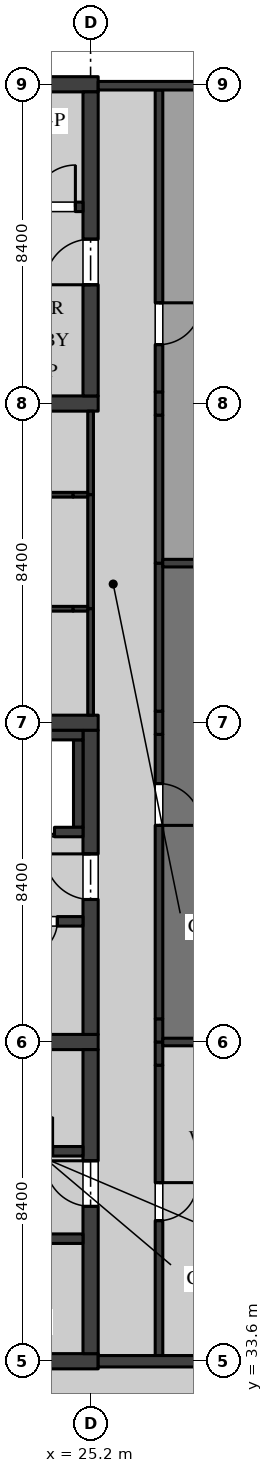
"""IFC4 building model, lengths in metres.
Left out: names, types, materials, properties, quantities, classifications, styles, units other than length and angle.
Written with IfcOpenShell. Run it as: python <this file> out.ifc"""

import sys

from ifc_helpers import new_model, si_unit, direction, frame, frame_2d, origin, place, context, subcontext, project, spatial, rectangle, extrude, element, fill, save


model = new_model("IFC4")
c1 = context("Model", 3, precision=1e-05, world=origin(), true_north=direction((0.0, 1.0)))
c2 = subcontext(c1, "Body", "Model", "MODEL_VIEW")
j1 = project(units=[si_unit("LENGTHUNIT", "METRE"), si_unit("PLANEANGLEUNIT", "RADIAN")], contexts=[c1])
p1 = place(None, origin())
s1 = spatial("IfcSite", under=j1, at=p1, CompositionType="ELEMENT")
p2 = place(p1, origin())
s2 = spatial("IfcBuilding", under=s1, at=p2, CompositionType="ELEMENT")
p3 = place(p2, frame((0.0, 0.0, 14.4)))
s3 = spatial("IfcBuildingStorey", under=s2, at=p3, CompositionType="ELEMENT", Elevation=14.4)
p4 = place(p3, frame((16.6, 42.0, 0.0), z_axis=(0.0, 0.0, 1.0), x_axis=(1.0, 0.0, 0.0)))
e1 = element("IfcWall", 1, at=p4, inside=s3, PredefinedType="SHEAR", context=c2, shape_type="SweptSolid", body=[
    extrude(rectangle(XDim=8.8, YDim=0.4, at=frame_2d((4.4, 0.0))), origin(), (0.0, 0.0, 1.0), 4.37),
])
p5 = place(p4, frame((1.05, 0.0, 0.0)))
e2 = element("IfcOpeningElement", 2, at=p5, cuts=e1, PredefinedType="OPENING", context=c2, shape_type="SweptSolid", body=[
    extrude(rectangle(XDim=1.1, YDim=2.1, at=frame_2d((0.55, 1.05))), frame((0.0, 0.21, 0.0), z_axis=(0.0, -1.0, 0.0), x_axis=(1.0, 0.0, 0.0)), (0.0, 0.0, 1.0), 0.42),
])
p6 = place(p3, frame((16.6, 50.4, 0.0), z_axis=(0.0, 0.0, 1.0), x_axis=(1.0, 0.0, 0.0)))
e3 = element("IfcWall", 3, at=p6, inside=s3, PredefinedType="SHEAR", context=c2, shape_type="SweptSolid", body=[
    extrude(rectangle(XDim=8.8, YDim=0.4, at=frame_2d((4.4, 0.0))), origin(), (0.0, 0.0, 1.0), 4.37),
])
p7 = place(p3, frame((25.2, 42.2, 0.0), z_axis=(0.0, 0.0, 1.0), x_axis=(0.0, 1.0, 0.0)))
e4 = element("IfcWall", 4, at=p7, inside=s3, PredefinedType="SHEAR", context=c2, shape_type="SweptSolid", body=[
    extrude(rectangle(XDim=8.0, YDim=0.4, at=frame_2d((4.0, 0.0))), origin(), (0.0, 0.0, 1.0), 4.37),
])
p8 = place(p7, frame((3.55, 0.0, 0.0)))
e5 = element("IfcOpeningElement", 5, at=p8, cuts=e4, PredefinedType="OPENING", context=c2, shape_type="SweptSolid", body=[
    extrude(rectangle(XDim=1.2, YDim=2.1, at=frame_2d((0.6, 1.05))), frame((0.0, 0.21, 0.0), z_axis=(0.0, -1.0, 0.0), x_axis=(1.0, 0.0, 0.0)), (0.0, 0.0, 1.0), 0.42),
])
p9 = place(p3, frame((25.0, 45.175, 0.0), z_axis=(0.0, 0.0, 1.0), x_axis=(-1.0, 0.0, 0.0)))
e6 = element("IfcWall", 6, at=p9, inside=s3, PredefinedType="SOLIDWALL", context=c2, shape_type="SweptSolid", body=[
    extrude(rectangle(XDim=2.25, YDim=0.25, at=frame_2d((1.125, 0.0))), origin(), (0.0, 0.0, 1.0), 4.37),
])
p10 = place(p9, frame((0.675, 0.0, 0.0)))
e7 = element("IfcOpeningElement", 7, at=p10, cuts=e6, PredefinedType="OPENING", context=c2, shape_type="SweptSolid", body=[
    extrude(rectangle(XDim=0.9, YDim=2.1, at=frame_2d((0.45, 1.05))), frame((0.0, 0.135, 0.0), z_axis=(0.0, -1.0, 0.0), x_axis=(1.0, 0.0, 0.0)), (0.0, 0.0, 1.0), 0.27),
])
for number, where, z_axis, x_axis in (
    (8, (16.6, 58.8, 0.0), (0.0, 0.0, 1.0), (1.0, 0.0, 0.0)),
    (9, (16.6, 67.2, 0.0), (0.0, 0.0, 1.0), (1.0, 0.0, 0.0)),
):
    element("IfcWall", number, at=place(p3, frame(where, z_axis=z_axis, x_axis=x_axis)), inside=s3, PredefinedType="SHEAR", context=c2, shape_type="SweptSolid", body=[
        extrude(rectangle(XDim=8.8, YDim=0.4, at=frame_2d((4.4, 0.0))), origin(), (0.0, 0.0, 1.0), 4.37),
    ])
p11 = place(p3, frame((25.2, 59.0, 0.0), z_axis=(0.0, 0.0, 1.0), x_axis=(0.0, 1.0, 0.0)))
e10 = element("IfcWall", 10, at=p11, inside=s3, PredefinedType="SHEAR", context=c2, shape_type="SweptSolid", body=[
    extrude(rectangle(XDim=8.0, YDim=0.4, at=frame_2d((4.0, 0.0))), origin(), (0.0, 0.0, 1.0), 4.37),
])
p12 = place(p11, frame((2.925, 0.0, 0.0)))
e11 = element("IfcOpeningElement", 11, at=p12, cuts=e10, PredefinedType="OPENING", context=c2, shape_type="SweptSolid", body=[
    extrude(rectangle(XDim=1.2, YDim=2.1, at=frame_2d((0.6, 1.05))), frame((0.0, 0.21, 0.0), z_axis=(0.0, -1.0, 0.0), x_axis=(1.0, 0.0, 0.0)), (0.0, 0.0, 1.0), 0.42),
])
p13 = place(p3, frame((25.0, 63.975, 0.0), z_axis=(0.0, 0.0, 1.0), x_axis=(-1.0, 0.0, 0.0)))
e12 = element("IfcWall", 12, at=p13, inside=s3, PredefinedType="SOLIDWALL", context=c2, shape_type="SweptSolid", body=[
    extrude(rectangle(XDim=8.0, YDim=0.25, at=frame_2d((4.0, 0.0))), origin(), (0.0, 0.0, 1.0), 4.37),
])
p14 = place(p13, frame((0.2, 0.0, 0.0)))
e13 = element("IfcOpeningElement", 13, at=p14, cuts=e12, PredefinedType="OPENING", context=c2, shape_type="SweptSolid", body=[
    extrude(rectangle(XDim=1.1, YDim=2.1, at=frame_2d((0.55, 1.05))), frame((0.0, 0.135, 0.0), z_axis=(0.0, -1.0, 0.0), x_axis=(1.0, 0.0, 0.0)), (0.0, 0.0, 1.0), 0.27),
])
p15 = place(p3, frame((16.6, 33.6, 0.0), z_axis=(0.0, 0.0, 1.0), x_axis=(1.0, 0.0, 0.0)))
e14 = element("IfcWall", 14, at=p15, inside=s3, PredefinedType="SHEAR", context=c2, shape_type="SweptSolid", body=[
    extrude(rectangle(XDim=8.8, YDim=0.4, at=frame_2d((4.4, 0.0))), origin(), (0.0, 0.0, 1.0), 4.37),
])
p16 = place(p3, frame((25.2, 33.8, 0.0), z_axis=(0.0, 0.0, 1.0), x_axis=(0.0, 1.0, 0.0)))
e15 = element("IfcWall", 15, at=p16, inside=s3, PredefinedType="SHEAR", context=c2, shape_type="SweptSolid", body=[
    extrude(rectangle(XDim=8.0, YDim=0.4, at=frame_2d((4.0, 0.0))), origin(), (0.0, 0.0, 1.0), 4.37),
])
p17 = place(p16, frame((3.875, 0.0, 0.0)))
e16 = element("IfcOpeningElement", 16, at=p17, cuts=e15, PredefinedType="OPENING", context=c2, shape_type="SweptSolid", body=[
    extrude(rectangle(XDim=1.2, YDim=2.1, at=frame_2d((0.6, 1.05))), frame((0.0, 0.21, 0.0), z_axis=(0.0, -1.0, 0.0), x_axis=(1.0, 0.0, 0.0)), (0.0, 0.0, 1.0), 0.42),
])
p18 = place(p3, frame((17.0, 36.825, 0.0), z_axis=(0.0, 0.0, 1.0), x_axis=(1.0, 0.0, 0.0)))
e17 = element("IfcWall", 17, at=p18, inside=s3, PredefinedType="SOLIDWALL", context=c2, shape_type="SweptSolid", body=[
    extrude(rectangle(XDim=8.0, YDim=0.25, at=frame_2d((4.0, 0.0))), origin(), (0.0, 0.0, 1.0), 4.37),
])
p19 = place(p18, frame((0.2, 0.0, 0.0)))
e18 = element("IfcOpeningElement", 18, at=p19, cuts=e17, PredefinedType="OPENING", context=c2, shape_type="SweptSolid", body=[
    extrude(rectangle(XDim=1.1, YDim=2.1, at=frame_2d((0.55, 1.05))), frame((0.0, 0.135, 0.0), z_axis=(0.0, -1.0, 0.0), x_axis=(1.0, 0.0, 0.0)), (0.0, 0.0, 1.0), 0.27),
])
p20 = place(p3, frame((19.65, 39.125, 0.0), z_axis=(0.0, 0.0, 1.0), x_axis=(1.0, 0.0, 0.0)))
e19 = element("IfcWall", 19, at=p20, inside=s3, PredefinedType="SOLIDWALL", context=c2, shape_type="SweptSolid", body=[
    extrude(rectangle(XDim=5.35, YDim=0.25, at=frame_2d((2.675, 0.0))), origin(), (0.0, 0.0, 1.0), 4.37),
])
p21 = place(p20, frame((3.65, 0.0, 0.0)))
e20 = element("IfcOpeningElement", 20, at=p21, cuts=e19, PredefinedType="OPENING", context=c2, shape_type="SweptSolid", body=[
    extrude(rectangle(XDim=0.9, YDim=2.1, at=frame_2d((0.45, 1.05))), frame((0.0, 0.135, 0.0), z_axis=(0.0, -1.0, 0.0), x_axis=(1.0, 0.0, 0.0)), (0.0, 0.0, 1.0), 0.27),
])
p22 = place(p20, frame((0.9, 0.0, 0.0)))
e21 = element("IfcOpeningElement", 21, at=p22, cuts=e19, PredefinedType="OPENING", context=c2, shape_type="SweptSolid", body=[
    extrude(rectangle(XDim=0.8, YDim=2.1, at=frame_2d((0.4, 1.05))), frame((0.0, 0.135, 0.0), z_axis=(0.0, -1.0, 0.0), x_axis=(1.0, 0.0, 0.0)), (0.0, 0.0, 1.0), 0.27),
])
p23 = place(p3, frame((24.875, 47.65, 0.0), z_axis=(0.0, 0.0, 1.0), x_axis=(0.0, 1.0, 0.0)))
e22 = element("IfcWall", 22, at=p23, inside=s3, PredefinedType="SOLIDWALL", context=c2, shape_type="SweptSolid", body=[
    extrude(rectangle(XDim=2.3, YDim=0.25, at=frame_2d((1.15, 0.0))), origin(), (0.0, 0.0, 1.0), 4.37),
])
p24 = place(p3, frame((21.7, 50.075, 0.0), z_axis=(0.0, 0.0, 1.0), x_axis=(1.0, 0.0, 0.0)))
e23 = element("IfcWall", 23, at=p24, inside=s3, PredefinedType="SOLIDWALL", context=c2, shape_type="SweptSolid", body=[
    extrude(rectangle(XDim=3.3, YDim=0.25, at=frame_2d((1.65, 0.0))), origin(), (0.0, 0.0, 1.0), 4.37),
])
p25 = place(p3, frame((21.7, 47.525, 0.0), z_axis=(0.0, 0.0, 1.0), x_axis=(1.0, 0.0, 0.0)))
e24 = element("IfcWall", 24, at=p25, inside=s3, PredefinedType="SOLIDWALL", context=c2, shape_type="SweptSolid", body=[
    extrude(rectangle(XDim=3.3, YDim=0.25, at=frame_2d((1.65, 0.0))), origin(), (0.0, 0.0, 1.0), 4.37),
])
p26 = place(p25, frame((0.75, 0.0, 0.0)))
e25 = element("IfcOpeningElement", 25, at=p26, cuts=e24, PredefinedType="OPENING", context=c2, shape_type="SweptSolid", body=[
    extrude(rectangle(XDim=1.8, YDim=2.1, at=frame_2d((0.9, 1.05))), frame((0.0, 0.135, 0.0), z_axis=(0.0, -1.0, 0.0), x_axis=(1.0, 0.0, 0.0)), (0.0, 0.0, 1.0), 0.27),
])
p27 = place(p3, frame((27.0, 33.75, 0.0), z_axis=(0.0, 0.0, 1.0), x_axis=(0.0, 1.0, 0.0)))
e26 = element("IfcWall", 26, at=p27, inside=s3, PredefinedType="PARTITIONING", context=c2, shape_type="SweptSolid", body=[
    extrude(rectangle(XDim=7.64, YDim=0.2, at=frame_2d((3.82, 0.0))), origin(), (0.0, 0.0, 1.0), 4.37),
])
p28 = place(p27, frame((3.55, 0.0, 0.0)))
e27 = element("IfcOpeningElement", 27, at=p28, cuts=e26, PredefinedType="OPENING", context=c2, shape_type="SweptSolid", body=[
    extrude(rectangle(XDim=1.0, YDim=2.1, at=frame_2d((0.5, 1.05))), frame((0.0, 0.11, 0.0), z_axis=(0.0, -1.0, 0.0), x_axis=(1.0, 0.0, 0.0)), (0.0, 0.0, 1.0), 0.22),
])
for number, where, z_axis, x_axis in (
    (28, (27.0, 41.39, 0.0), (0.0, 0.0, 1.0), (0.0, 1.0, 0.0)),
    (29, (27.0, 42.0, 0.0), (0.0, 0.0, 1.0), (0.0, 1.0, 0.0)),
):
    element("IfcWall", number, at=place(p3, frame(where, z_axis=z_axis, x_axis=x_axis)), inside=s3, PredefinedType="PARTITIONING", context=c2, shape_type="SweptSolid", body=[
        extrude(rectangle(XDim=0.61, YDim=0.2, at=frame_2d((0.305, 0.0))), origin(), (0.0, 0.0, 1.0), 3.746),
    ])
p29 = place(p3, frame((27.0, 42.61, 0.0), z_axis=(0.0, 0.0, 1.0), x_axis=(0.0, 1.0, 0.0)))
e30 = element("IfcWall", 30, at=p29, inside=s3, PredefinedType="PARTITIONING", context=c2, shape_type="SweptSolid", body=[
    extrude(rectangle(XDim=7.485, YDim=0.2, at=frame_2d((3.742, 0.0))), origin(), (0.0, 0.0, 1.0), 4.37),
])
p30 = place(p29, frame((5.09, 0.0, 0.0)))
e31 = element("IfcOpeningElement", 31, at=p30, cuts=e30, PredefinedType="OPENING", context=c2, shape_type="SweptSolid", body=[
    extrude(rectangle(XDim=1.1, YDim=2.1, at=frame_2d((0.55, 1.05))), frame((0.0, 0.11, 0.0), z_axis=(0.0, -1.0, 0.0), x_axis=(1.0, 0.0, 0.0)), (0.0, 0.0, 1.0), 0.22),
])
p31 = place(p3, frame((27.0, 50.095, 0.0), z_axis=(0.0, 0.0, 1.0), x_axis=(0.0, 1.0, 0.0)))
e32 = element("IfcWall", 32, at=p31, inside=s3, PredefinedType="PARTITIONING", context=c2, shape_type="SweptSolid", body=[
    extrude(rectangle(XDim=0.61, YDim=0.2, at=frame_2d((0.305, 0.0))), origin(), (0.0, 0.0, 1.0), 3.746),
])
for number, where, z_axis, x_axis in (
    (33, (27.0, 50.705, 0.0), (0.0, 0.0, 1.0), (0.0, 1.0, 0.0)),
    (34, (27.0, 54.6, 0.0), (0.0, 0.0, 1.0), (0.0, 1.0, 0.0)),
):
    element("IfcWall", number, at=place(p3, frame(where, z_axis=z_axis, x_axis=x_axis)), inside=s3, PredefinedType="PARTITIONING", context=c2, shape_type="SweptSolid", body=[
        extrude(rectangle(XDim=3.895, YDim=0.2, at=frame_2d((1.948, 0.0))), origin(), (0.0, 0.0, 1.0), 4.37),
    ])
p32 = place(p3, frame((27.0, 58.495, 0.0), z_axis=(0.0, 0.0, 1.0), x_axis=(0.0, 1.0, 0.0)))
e35 = element("IfcWall", 35, at=p32, inside=s3, PredefinedType="PARTITIONING", context=c2, shape_type="SweptSolid", body=[
    extrude(rectangle(XDim=0.61, YDim=0.2, at=frame_2d((0.305, 0.0))), origin(), (0.0, 0.0, 1.0), 3.746),
])
p33 = place(p3, frame((27.0, 59.105, 0.0), z_axis=(0.0, 0.0, 1.0), x_axis=(0.0, 1.0, 0.0)))
e36 = element("IfcWall", 36, at=p33, inside=s3, PredefinedType="PARTITIONING", context=c2, shape_type="SweptSolid", body=[
    extrude(rectangle(XDim=7.945, YDim=0.2, at=frame_2d((3.973, 0.0))), origin(), (0.0, 0.0, 1.0), 4.37),
])
p34 = place(p33, frame((1.245, 0.0, 0.0)))
e37 = element("IfcOpeningElement", 37, at=p34, cuts=e36, PredefinedType="OPENING", context=c2, shape_type="SweptSolid", body=[
    extrude(rectangle(XDim=1.1, YDim=2.1, at=frame_2d((0.55, 1.05))), frame((0.0, 0.11, 0.0), z_axis=(0.0, -1.0, 0.0), x_axis=(1.0, 0.0, 0.0)), (0.0, 0.0, 1.0), 0.22),
])
p35 = place(p3, frame((25.2, 56.4, 0.0), z_axis=(0.0, 0.0, 1.0), x_axis=(0.0, 1.0, 0.0)))
e38 = element("IfcWall", 38, at=p35, inside=s3, PredefinedType="PARTITIONING", context=c2, shape_type="SweptSolid", body=[
    extrude(rectangle(XDim=2.2, YDim=0.15, at=frame_2d((1.1, 0.0))), origin(), (0.0, 0.0, 1.0), 3.746),
])
p36 = place(p3, frame((25.2, 53.4, 0.0), z_axis=(0.0, 0.0, 1.0), x_axis=(0.0, 1.0, 0.0)))
e39 = element("IfcWall", 39, at=p36, inside=s3, PredefinedType="PARTITIONING", context=c2, shape_type="SweptSolid", body=[
    extrude(rectangle(XDim=3.0, YDim=0.15, at=frame_2d((1.5, 0.0))), origin(), (0.0, 0.0, 1.0), 3.746),
])
p37 = place(p3, frame((25.2, 50.6, 0.0), z_axis=(0.0, 0.0, 1.0), x_axis=(0.0, 1.0, 0.0)))
e40 = element("IfcWall", 40, at=p37, inside=s3, PredefinedType="PARTITIONING", context=c2, shape_type="SweptSolid", body=[
    extrude(rectangle(XDim=2.8, YDim=0.15, at=frame_2d((1.4, 0.0))), origin(), (0.0, 0.0, 1.0), 3.746),
])
p38 = place(p3, frame((27.1, 42.0, 0.0), z_axis=(0.0, 0.0, 1.0), x_axis=(1.0, 0.0, 0.0)))
e41 = element("IfcWall", 41, at=p38, inside=s3, PredefinedType="PARTITIONING", context=c2, shape_type="SweptSolid", body=[
    extrude(rectangle(XDim=6.315, YDim=0.2, at=frame_2d((3.157, 0.0))), origin(), (0.0, 0.0, 1.0), 3.746),
])
p39 = place(p3, frame((27.1, 54.6, 0.0), z_axis=(0.0, 0.0, 1.0), x_axis=(1.0, 0.0, 0.0)))
e42 = element("IfcWall", 42, at=p39, inside=s3, PredefinedType="PARTITIONING", context=c2, shape_type="SweptSolid", body=[
    extrude(rectangle(XDim=1.205, YDim=0.2, at=frame_2d((0.603, 0.0))), origin(), (0.0, 0.0, 1.0), 3.895),
])
p40 = place(p3, frame((22.592, 56.4, 0.0), z_axis=(0.0, 0.0, 1.0), x_axis=(1.0, 0.0, 0.0)))
e43 = element("IfcWall", 43, at=p40, inside=s3, PredefinedType="PARTITIONING", context=c2, shape_type="SweptSolid", body=[
    extrude(rectangle(XDim=2.148, YDim=0.125, at=frame_2d((1.074, 0.0))), origin(), (0.0, 0.0, 1.0), 4.37),
])
p41 = place(p3, frame((24.74, 56.4, 0.0), z_axis=(0.0, 0.0, 1.0), x_axis=(1.0, 0.0, 0.0)))
e44 = element("IfcWall", 44, at=p41, inside=s3, PredefinedType="PARTITIONING", context=c2, shape_type="SweptSolid", body=[
    extrude(rectangle(XDim=0.385, YDim=0.125, at=frame_2d((0.192, 0.0))), origin(), (0.0, 0.0, 1.0), 3.746),
])
p42 = place(p3, frame((22.592, 53.4, 0.0), z_axis=(0.0, 0.0, 1.0), x_axis=(1.0, 0.0, 0.0)))
e45 = element("IfcWall", 45, at=p42, inside=s3, PredefinedType="PARTITIONING", context=c2, shape_type="SweptSolid", body=[
    extrude(rectangle(XDim=2.148, YDim=0.125, at=frame_2d((1.074, 0.0))), origin(), (0.0, 0.0, 1.0), 4.37),
])
p43 = place(p3, frame((24.74, 53.4, 0.0), z_axis=(0.0, 0.0, 1.0), x_axis=(1.0, 0.0, 0.0)))
e46 = element("IfcWall", 46, at=p43, inside=s3, PredefinedType="PARTITIONING", context=c2, shape_type="SweptSolid", body=[
    extrude(rectangle(XDim=0.385, YDim=0.125, at=frame_2d((0.192, 0.0))), origin(), (0.0, 0.0, 1.0), 3.746),
])
p44 = place(p3, frame((33.595, 67.163, 0.0), z_axis=(0.0, 0.0, 1.0), x_axis=(-1.0, 0.0, 0.0)))
e47 = element("IfcWall", 47, at=p44, inside=s3, PredefinedType="SOLIDWALL", context=c2, shape_type="SweptSolid", body=[
    extrude(rectangle(XDim=8.195, YDim=0.225, at=frame_2d((4.098, 0.0))), origin(), (0.0, 0.0, 1.0), 3.746),
])
p45 = place(p44, frame((0.895, 0.0, 1.5)))
e48 = element("IfcOpeningElement", 48, at=p45, cuts=e47, PredefinedType="OPENING", context=c2, shape_type="SweptSolid", body=[
    extrude(rectangle(XDim=2.4, YDim=0.9, at=frame_2d((1.2, 0.45))), frame((0.0, 0.123, 0.0), z_axis=(0.0, -1.0, 0.0), x_axis=(1.0, 0.0, 0.0)), (0.0, 0.0, 1.0), 0.245),
])
p46 = place(p3, frame((33.597, 33.6, 0.0), z_axis=(0.0, 0.0, 1.0), x_axis=(-1.0, 0.0, 0.0)))
e49 = element("IfcWall", 49, at=p46, inside=s3, PredefinedType="SOLIDWALL", context=c2, shape_type="SweptSolid", body=[
    extrude(rectangle(XDim=8.197, YDim=0.3, at=frame_2d((4.098, 0.0))), origin(), (0.0, 0.0, 1.0), 3.746),
])
p47 = place(p8, origin())
e50 = element("IfcDoor", 50, at=p47, inside=s3, OperationType="SINGLE_SWING_LEFT", PredefinedType="DOOR", context=c2, shape_type="SweptSolid", body=[
    extrude(rectangle(XDim=1.2, YDim=2.1, at=frame_2d((0.6, 1.05))), frame((0.0, 0.035, 0.0), z_axis=(0.0, -1.0, 0.0), x_axis=(1.0, 0.0, 0.0)), (0.0, 0.0, 1.0), 0.07),
])
fill(e5, e50)
p48 = place(p10, origin())
e51 = element("IfcDoor", 51, at=p48, inside=s3, OperationType="SINGLE_SWING_LEFT", PredefinedType="DOOR", context=c2, shape_type="SweptSolid", body=[
    extrude(rectangle(XDim=0.9, YDim=2.1, at=frame_2d((0.45, 1.05))), frame((0.0, 0.05, 0.0), z_axis=(0.0, -1.0, 0.0), x_axis=(1.0, 0.0, 0.0)), (0.0, 0.0, 1.0), 0.1),
])
fill(e7, e51)
p49 = place(p12, origin())
e52 = element("IfcDoor", 52, at=p49, inside=s3, OperationType="SINGLE_SWING_RIGHT", PredefinedType="DOOR", context=c2, shape_type="SweptSolid", body=[
    extrude(rectangle(XDim=1.2, YDim=2.1, at=frame_2d((0.6, 1.05))), frame((0.0, 0.035, 0.0), z_axis=(0.0, -1.0, 0.0), x_axis=(1.0, 0.0, 0.0)), (0.0, 0.0, 1.0), 0.07),
])
fill(e11, e52)
p50 = place(p14, frame((1.1, 0.0, 0.0), z_axis=(0.0, 0.0, 1.0), x_axis=(-1.0, 0.0, 0.0)))
e53 = element("IfcDoor", 53, at=p50, inside=s3, OperationType="SINGLE_SWING_LEFT", PredefinedType="DOOR", context=c2, shape_type="SweptSolid", body=[
    extrude(rectangle(XDim=1.1, YDim=2.1, at=frame_2d((0.55, 1.05))), frame((0.0, 0.035, 0.0), z_axis=(0.0, -1.0, 0.0), x_axis=(1.0, 0.0, 0.0)), (0.0, 0.0, 1.0), 0.07),
])
fill(e13, e53)
p51 = place(p17, origin())
e54 = element("IfcDoor", 54, at=p51, inside=s3, OperationType="SINGLE_SWING_LEFT", PredefinedType="DOOR", context=c2, shape_type="SweptSolid", body=[
    extrude(rectangle(XDim=1.2, YDim=2.1, at=frame_2d((0.6, 1.05))), frame((0.0, 0.035, 0.0), z_axis=(0.0, -1.0, 0.0), x_axis=(1.0, 0.0, 0.0)), (0.0, 0.0, 1.0), 0.07),
])
fill(e16, e54)
p52 = place(p26, origin())
e55 = element("IfcDoor", 55, at=p52, inside=s3, OperationType="DOUBLE_DOOR_SLIDING", PredefinedType="DOOR", context=c2, shape_type="SweptSolid", body=[
    extrude(rectangle(XDim=1.8, YDim=2.1, at=frame_2d((0.9, 1.05))), frame((0.0, 0.04, 0.0), z_axis=(0.0, -1.0, 0.0), x_axis=(1.0, 0.0, 0.0)), (0.0, 0.0, 1.0), 0.08),
])
fill(e25, e55)
p53 = place(p28, frame((1.0, 0.0, 0.0), z_axis=(0.0, 0.0, 1.0), x_axis=(-1.0, 0.0, 0.0)))
e56 = element("IfcDoor", 56, at=p53, inside=s3, OperationType="SINGLE_SWING_RIGHT", PredefinedType="DOOR", context=c2, shape_type="SweptSolid", body=[
    extrude(rectangle(XDim=1.0, YDim=2.1, at=frame_2d((0.5, 1.05))), frame((0.0, 0.025, 0.0), z_axis=(0.0, -1.0, 0.0), x_axis=(1.0, 0.0, 0.0)), (0.0, 0.0, 1.0), 0.05),
])
fill(e27, e56)
p54 = place(p30, frame((1.1, 0.0, 0.0), z_axis=(0.0, 0.0, 1.0), x_axis=(-1.0, 0.0, 0.0)))
e57 = element("IfcDoor", 57, at=p54, inside=s3, OperationType="SINGLE_SWING_LEFT", PredefinedType="DOOR", context=c2, shape_type="SweptSolid", body=[
    extrude(rectangle(XDim=1.1, YDim=2.1, at=frame_2d((0.55, 1.05))), frame((0.0, 0.025, 0.0), z_axis=(0.0, -1.0, 0.0), x_axis=(1.0, 0.0, 0.0)), (0.0, 0.0, 1.0), 0.05),
])
fill(e31, e57)
p55 = place(p34, frame((1.1, 0.0, 0.0), z_axis=(0.0, 0.0, 1.0), x_axis=(-1.0, 0.0, 0.0)))
e58 = element("IfcDoor", 58, at=p55, inside=s3, OperationType="SINGLE_SWING_RIGHT", PredefinedType="DOOR", context=c2, shape_type="SweptSolid", body=[
    extrude(rectangle(XDim=1.1, YDim=2.1, at=frame_2d((0.55, 1.05))), frame((0.0, 0.025, 0.0), z_axis=(0.0, -1.0, 0.0), x_axis=(1.0, 0.0, 0.0)), (0.0, 0.0, 1.0), 0.05),
])
fill(e37, e58)
save(model, sys.argv[1])
